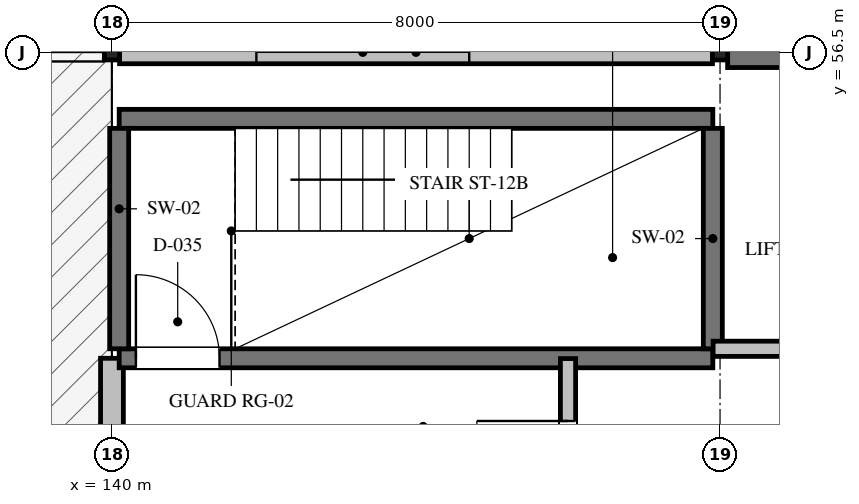
"""IFC4 building model, lengths in metres.
Left out: names, types, materials, properties, quantities, classifications, styles, units other than length and angle.
Written with IfcOpenShell. Run it as: python <this file> out.ifc"""

import sys

from ifc_helpers import new_model, si_unit, direction, frame, frame_2d, origin, origin_2d, place, context, subcontext, project, spatial, rectangle, i_section, extrude, element, fill, save


model = new_model("IFC4")
c1 = context("Model", 3, precision=1e-05, world=origin(), true_north=direction((0.0, 1.0)))
c2 = subcontext(c1, "Body", "Model", "MODEL_VIEW")
j1 = project(units=[si_unit("LENGTHUNIT", "METRE"), si_unit("PLANEANGLEUNIT", "RADIAN")], contexts=[c1])
p1 = place(None, origin())
s1 = spatial("IfcSite", under=j1, at=p1, CompositionType="ELEMENT")
p2 = place(p1, origin())
s2 = spatial("IfcBuilding", under=s1, at=p2, CompositionType="ELEMENT")
p3 = place(p2, frame((0.0, 0.0, 22.65)))
s3 = spatial("IfcBuildingStorey", under=s2, at=p3, CompositionType="ELEMENT", Elevation=22.65)
for number, where, z_axis, x_axis in (
    (1, (140.0, 56.5, 0.0), (0.0, 0.0, 1.0), (1.0, 0.0, 0.0)),
    (2, (148.0, 56.5, 0.0), (0.0, 0.0, 1.0), (1.0, 0.0, 0.0)),
):
    element("IfcColumn", number, at=place(p3, frame(where, z_axis=z_axis, x_axis=x_axis)), inside=s3, PredefinedType="COLUMN", context=c2, shape_type="SweptSolid", body=[
        extrude(i_section(OverallWidth=0.2, OverallDepth=0.2, WebThickness=0.008, FlangeThickness=0.012, FilletRadius=0.013, at=origin_2d()), origin(), (0.0, 0.0, 1.0), 4.2),
    ])
p4 = place(p3, frame((140.1, 56.5, 0.0), z_axis=(0.0, 0.0, 1.0), x_axis=(1.0, 0.0, 0.0)))
e3 = element("IfcWall", 3, at=p4, inside=s3, PredefinedType="SOLIDWALL", context=c2, shape_type="SweptSolid", body=[
    extrude(rectangle(XDim=7.8, YDim=0.3, at=frame_2d((3.9, 0.0))), origin(), (0.0, 0.0, 1.0), 3.474),
])
p5 = place(p4, frame((1.8, 0.0, 0.9)))
e4 = element("IfcOpeningElement", 4, at=p5, cuts=e3, PredefinedType="OPENING", context=c2, shape_type="SweptSolid", body=[
    extrude(rectangle(XDim=2.8, YDim=1.2, at=frame_2d((1.4, 0.6))), frame((0.0, 0.16, 0.0), z_axis=(0.0, -1.0, 0.0), x_axis=(1.0, 0.0, 0.0)), (0.0, 0.0, 1.0), 0.32),
])
p6 = place(p3, frame((148.1, 56.5, 0.0), z_axis=(0.0, 0.0, 1.0), x_axis=(1.0, 0.0, 0.0)))
e5 = element("IfcWall", 5, at=p6, inside=s3, PredefinedType="SHEAR", context=c2, shape_type="SweptSolid", body=[
    extrude(rectangle(XDim=12.8, YDim=0.4, at=frame_2d((6.4, 0.0))), origin(), (0.0, 0.0, 1.0), 3.98),
])
p7 = place(p6, frame((1.8, 0.0, 0.9)))
e6 = element("IfcOpeningElement", 6, at=p7, cuts=e5, PredefinedType="OPENING", context=c2, shape_type="SweptSolid", body=[
    extrude(rectangle(XDim=0.8, YDim=1.3, at=frame_2d((0.4, 0.65))), frame((0.0, 0.21, 0.0), z_axis=(0.0, -1.0, 0.0), x_axis=(1.0, 0.0, 0.0)), (0.0, 0.0, 1.0), 0.42),
])
p8 = place(p3, frame((140.0, 49.625, 0.0), z_axis=(0.0, 0.0, 1.0), x_axis=(0.0, 1.0, 0.0)))
e7 = element("IfcWall", 7, at=p8, inside=s3, PredefinedType="SOLIDWALL", context=c2, shape_type="SweptSolid", body=[
    extrude(rectangle(XDim=2.85, YDim=0.3, at=frame_2d((1.425, 0.0))), origin(), (0.0, 0.0, 1.0), 3.98),
])
p9 = place(p8, frame((0.65, 0.0, 0.0)))
e8 = element("IfcOpeningElement", 8, at=p9, cuts=e7, PredefinedType="OPENING", context=c2, shape_type="SweptSolid", body=[
    extrude(rectangle(XDim=1.1, YDim=2.2, at=frame_2d((0.55, 1.1))), frame((0.0, 0.16, 0.0), z_axis=(0.0, -1.0, 0.0), x_axis=(1.0, 0.0, 0.0)), (0.0, 0.0, 1.0), 0.32),
])
p10 = place(p3, frame((140.095, 52.475, 0.0), z_axis=(0.0, 0.0, 1.0), x_axis=(1.0, 0.0, 0.0)))
e9 = element("IfcWall", 9, at=p10, inside=s3, PredefinedType="SHEAR", context=c2, shape_type="SweptSolid", body=[
    extrude(rectangle(XDim=7.81, YDim=0.25, at=frame_2d((3.905, 0.0))), origin(), (0.0, 0.0, 1.0), 3.98),
])
p11 = place(p10, frame((0.22, 0.0, 0.0)))
e10 = element("IfcOpeningElement", 10, at=p11, cuts=e9, PredefinedType="OPENING", context=c2, shape_type="SweptSolid", body=[
    extrude(rectangle(XDim=1.1, YDim=2.15, at=frame_2d((0.55, 1.075))), frame((0.0, 0.135, 0.0), z_axis=(0.0, -1.0, 0.0), x_axis=(1.0, 0.0, 0.0)), (0.0, 0.0, 1.0), 0.27),
])
p12 = place(p3, frame((140.095, 55.625, 0.0), z_axis=(0.0, 0.0, 1.0), x_axis=(1.0, 0.0, 0.0)))
e11 = element("IfcWall", 11, at=p12, inside=s3, PredefinedType="SHEAR", context=c2, shape_type="SweptSolid", body=[
    extrude(rectangle(XDim=7.81, YDim=0.25, at=frame_2d((3.905, 0.0))), origin(), (0.0, 0.0, 1.0), 3.98),
])
for number, where, z_axis, x_axis in (
    (12, (140.095, 52.6, 0.0), (0.0, 0.0, 1.0), (0.0, 1.0, 0.0)),
    (13, (147.905, 52.6, 0.0), (0.0, 0.0, 1.0), (0.0, 1.0, 0.0)),
):
    element("IfcWall", number, at=place(p3, frame(where, z_axis=z_axis, x_axis=x_axis)), inside=s3, PredefinedType="SHEAR", context=c2, shape_type="SweptSolid", body=[
        extrude(rectangle(XDim=2.9, YDim=0.25, at=frame_2d((1.45, 0.0))), origin(), (0.0, 0.0, 1.0), 3.98),
    ])
p13 = place(p3, frame((147.909, 52.6, 0.0), z_axis=(0.0, 0.0, 1.0), x_axis=(1.0, 0.0, 0.0)))
e14 = element("IfcWall", 14, at=p13, inside=s3, PredefinedType="PARTITIONING", context=c2, shape_type="SweptSolid", body=[
    extrude(rectangle(XDim=1.362, YDim=0.2, at=frame_2d((0.681, 0.0))), origin(), (0.0, 0.0, 1.0), 3.98),
])
p14 = place(p3, frame((146.0, 48.504, 0.0), z_axis=(0.0, 0.0, 1.0), x_axis=(0.0, 1.0, 0.0)))
e15 = element("IfcWall", 15, at=p14, inside=s3, PredefinedType="PARTITIONING", context=c2, shape_type="SweptSolid", body=[
    extrude(rectangle(XDim=3.967, YDim=0.2, at=frame_2d((1.983, 0.0))), origin(), (0.0, 0.0, 1.0), 3.98),
])
p15 = place(p14, frame((1.946, 0.0, 0.0)))
e16 = element("IfcOpeningElement", 16, at=p15, cuts=e15, PredefinedType="OPENING", context=c2, shape_type="SweptSolid", body=[
    extrude(rectangle(XDim=1.2, YDim=2.15, at=frame_2d((0.6, 1.075))), frame((0.0, 0.11, 0.0), z_axis=(0.0, -1.0, 0.0), x_axis=(1.0, 0.0, 0.0)), (0.0, 0.0, 1.0), 0.22),
])
p16 = place(p5, origin())
e17 = element("IfcWindow", 17, at=p16, inside=s3, PartitioningType="SINGLE_PANEL", PredefinedType="WINDOW", context=c2, shape_type="SweptSolid", body=[
    extrude(rectangle(XDim=2.8, YDim=1.2, at=frame_2d((1.4, 0.6))), frame((0.0, 0.03, 0.0), z_axis=(0.0, -1.0, 0.0), x_axis=(1.0, 0.0, 0.0)), (0.0, 0.0, 1.0), 0.06),
])
fill(e4, e17)
p17 = place(p11, frame((1.1, 0.0, 0.0), z_axis=(0.0, 0.0, 1.0), x_axis=(-1.0, 0.0, 0.0)))
e18 = element("IfcDoor", 18, at=p17, inside=s3, OperationType="SINGLE_SWING_LEFT", PredefinedType="DOOR", context=c2, shape_type="SweptSolid", body=[
    extrude(rectangle(XDim=1.1, YDim=2.15, at=frame_2d((0.55, 1.075))), frame((0.0, 0.025, 0.0), z_axis=(0.0, -1.0, 0.0), x_axis=(1.0, 0.0, 0.0)), (0.0, 0.0, 1.0), 0.05),
])
fill(e10, e18)
p18 = place(p15, origin())
e19 = element("IfcDoor", 19, at=p18, inside=s3, OperationType="SINGLE_SWING_RIGHT", PredefinedType="DOOR", context=c2, shape_type="SweptSolid", body=[
    extrude(rectangle(XDim=1.2, YDim=2.15, at=frame_2d((0.6, 1.075))), frame((0.0, 0.025, 0.0), z_axis=(0.0, -1.0, 0.0), x_axis=(1.0, 0.0, 0.0)), (0.0, 0.0, 1.0), 0.05),
])
fill(e16, e19)
save(model, sys.argv[1])
